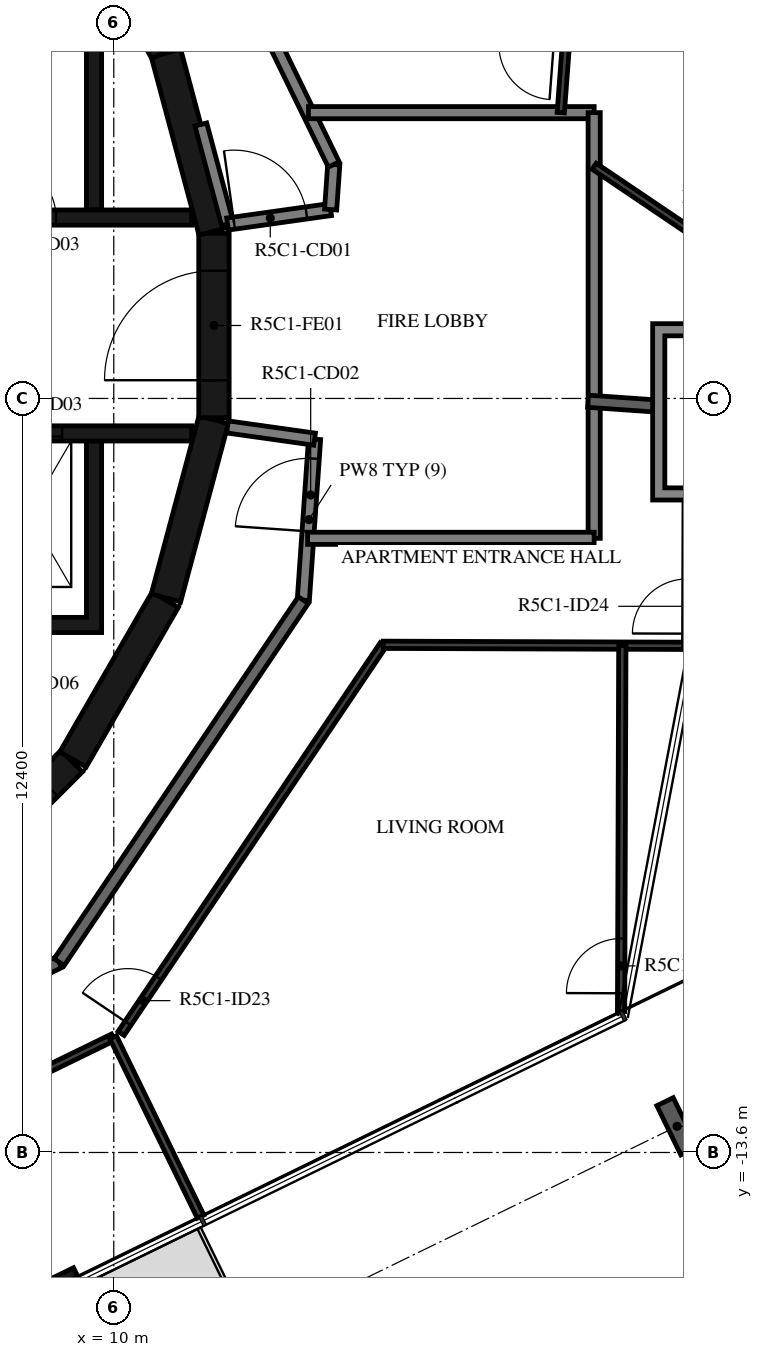
"""IFC4 building model, lengths in metres.
Left out: names, types, materials, properties, quantities, classifications, styles, units other than length and angle.
Written with IfcOpenShell. Run it as: python <this file> out.ifc"""

import sys

from ifc_helpers import new_model, si_unit, direction, frame, frame_2d, origin, origin_2d, place, context, subcontext, project, spatial, polyline, rectangle, i_section, outline, extrude, element, fill, save


model = new_model("IFC4")
c1 = context("Model", 3, precision=1e-05, world=origin(), true_north=direction((0.0, 1.0)))
c2 = subcontext(c1, "Body", "Model", "MODEL_VIEW")
j1 = project(units=[si_unit("LENGTHUNIT", "METRE"), si_unit("PLANEANGLEUNIT", "RADIAN")], contexts=[c1])
p1 = place(None, origin())
s1 = spatial("IfcSite", under=j1, at=p1, CompositionType="ELEMENT")
p2 = place(p1, origin())
s2 = spatial("IfcBuilding", under=s1, at=p2, CompositionType="ELEMENT")
p3 = place(p2, frame((0.0, 0.0, 212.9)))
s3 = spatial("IfcBuildingStorey", under=s2, at=p3, CompositionType="ELEMENT", Elevation=212.9)
p4 = place(p3, frame((19.263, -13.169, -0.38), z_axis=(0.0, 0.0, 1.0), x_axis=(-0.898794095235, -0.438371046456, 0.0)))
e1 = element("IfcColumn", 1, at=p4, inside=s3, PredefinedType="COLUMN", context=c2, shape_type="SweptSolid", body=[
    extrude(i_section(OverallWidth=0.3, OverallDepth=0.9, WebThickness=0.019, FlangeThickness=0.035, FilletRadius=0.03, at=origin_2d()), origin(), (0.0, 0.0, 1.0), 3.5),
])
p5 = place(p3, frame((6.497, -16.97, 0.0), z_axis=(0.0, 0.0, 1.0), x_axis=(0.898778711213, 0.43840258698, 0.0)))
e2 = element("IfcWall", 2, at=p5, inside=s3, PredefinedType="STANDARD", context=c2, shape_type="SweptSolid", body=[
    extrude(rectangle(XDim=3.2, YDim=0.16, at=frame_2d((1.6, 0.0))), origin(), (0.0, 0.0, 1.0), 3.12),
])
p6 = place(p5, frame((0.4, 0.0, 0.0)))
e3 = element("IfcOpeningElement", 3, at=p6, cuts=e2, PredefinedType="OPENING", context=c2, shape_type="SweptSolid", body=[
    extrude(rectangle(XDim=2.4, YDim=2.4, at=frame_2d((1.2, 1.2))), frame((0.0, 0.09, 0.0), z_axis=(0.0, -1.0, 0.0), x_axis=(1.0, 0.0, 0.0)), (0.0, 0.0, 1.0), 0.18),
])
p7 = place(p3, frame((7.164, -9.308, 0.0), z_axis=(0.0, 0.0, 1.0), x_axis=(0.707106781187, 0.707106781187, 0.0)))
e4 = element("IfcWall", 4, at=p7, inside=s3, PredefinedType="SHEAR", context=c2, shape_type="SweptSolid", body=[
    extrude(rectangle(XDim=3.032, YDim=0.5, at=frame_2d((1.516, 0.0))), origin(), (0.0, 0.0, 1.0), 3.12),
])
p8 = place(p7, frame((1.566, 0.0, 0.0)))
e5 = element("IfcOpeningElement", 5, at=p8, cuts=e4, PredefinedType="OPENING", context=c2, shape_type="SweptSolid", body=[
    extrude(rectangle(XDim=0.9, YDim=2.1, at=frame_2d((0.45, 1.05))), frame((0.0, 0.26, 0.0), z_axis=(0.0, -1.0, 0.0), x_axis=(1.0, 0.0, 0.0)), (0.0, 0.0, 1.0), 0.52),
])
for number, where, z_axis, x_axis in (
    (6, (9.329, -7.137, 0.0), (0.0, 0.0, 1.0), (0.5, 0.866, 0.0)),
    (7, (10.858, -4.479, 0.0), (0.0, 0.0, 1.0), (0.259, 0.966, 0.0)),
):
    element("IfcWall", number, at=place(p3, frame(where, z_axis=z_axis, x_axis=x_axis)), inside=s3, PredefinedType="SHEAR", context=c2, shape_type="SweptSolid", body=[
        extrude(rectangle(XDim=3.033, YDim=0.5, at=frame_2d((1.516, 0.0))), origin(), (0.0, 0.0, 1.0), 3.12),
    ])
p9 = place(p3, frame((11.647, -1.516, 0.0), z_axis=(0.0, 0.0, 1.0), x_axis=(0.0, 1.0, 0.0)))
e8 = element("IfcWall", 8, at=p9, inside=s3, PredefinedType="SHEAR", context=c2, shape_type="SweptSolid", body=[
    extrude(rectangle(XDim=3.033, YDim=0.5, at=frame_2d((1.516, 0.0))), origin(), (0.0, 0.0, 1.0), 3.12),
])
p10 = place(p9, frame((0.616, 0.0, 0.0)))
e9 = element("IfcOpeningElement", 9, at=p10, cuts=e8, PredefinedType="OPENING", context=c2, shape_type="SweptSolid", body=[
    extrude(rectangle(XDim=1.8, YDim=2.1, at=frame_2d((0.9, 1.05))), frame((0.0, 0.26, 0.0), z_axis=(0.0, -1.0, 0.0), x_axis=(1.0, 0.0, 0.0)), (0.0, 0.0, 1.0), 0.52),
])
for number, where, z_axis, x_axis in (
    (10, (11.643, 1.55, 0.0), (0.0, 0.0, 1.0), (-0.259, 0.966, 0.0)),
    (11, (10.845, 4.51, 0.0), (0.0, 0.0, 1.0), (-0.5, 0.866, 0.0)),
):
    element("IfcWall", number, at=place(p3, frame(where, z_axis=z_axis, x_axis=x_axis)), inside=s3, PredefinedType="SHEAR", context=c2, shape_type="SweptSolid", body=[
        extrude(rectangle(XDim=3.033, YDim=0.5, at=frame_2d((1.516, 0.0))), origin(), (0.0, 0.0, 1.0), 3.12),
    ])
p11 = place(p3, origin())
e12 = element("IfcWall", 12, at=p11, inside=s3, PredefinedType="SHEAR", context=c2, shape_type="SweptSolid", body=[
    extrude(outline(polyline([(-9.55, 4.8), (-5.5, 4.8), (-5.5, 1.9), (-5.25, 1.9), (-5.25, 4.8), (-1.2, 4.8), (-1.2, 1.9), (-0.95, 1.9), (-0.95, 4.8), (0.95, 4.8), (0.95, 1.9), (1.2, 1.9), (1.2, 4.8), (3.1, 4.8), (3.1, 1.9), (3.35, 1.9), (3.35, 4.8), (5.25, 4.8), (5.25, 1.9), (5.5, 1.9), (5.5, 4.8), (7.4, 4.8), (7.4, 1.9), (7.65, 1.9), (7.65, 4.8), (9.55, 4.8), (9.55, 1.9), (9.8, 1.9), (9.8, 4.8), (9.8, 5.05), (-9.8, 5.05), (-9.8, 4.8), (-9.8, 1.9), (-9.55, 1.9), (-9.55, 4.8)])), origin(), (0.0, 0.0, 1.0), 3.12),
])
p12 = place(p3, origin())
e13 = element("IfcWall", 13, at=p12, inside=s3, PredefinedType="SHEAR", context=c2, shape_type="SweptSolid", body=[
    extrude(outline(polyline([(9.8, -5.05), (9.8, -4.8), (9.8, -1.9), (9.55, -1.9), (9.55, -4.8), (7.65, -4.8), (7.65, -1.9), (7.4, -1.9), (7.4, -4.8), (5.5, -4.8), (5.5, -1.9), (5.25, -1.9), (5.25, -4.8), (3.35, -4.8), (3.35, -1.9), (3.1, -1.9), (3.1, -4.8), (1.2, -4.8), (1.2, -1.9), (0.95, -1.9), (0.95, -4.8), (-5.25, -4.8), (-5.25, -1.9), (-5.5, -1.9), (-5.5, -4.8), (-7.4, -4.8), (-7.4, -1.9), (-7.65, -1.9), (-7.65, -4.8), (-9.55, -4.8), (-9.55, -1.9), (-9.8, -1.9), (-9.8, -4.8), (-9.8, -5.05), (9.8, -5.05)])), origin(), (0.0, 0.0, 1.0), 3.12),
])
p13 = place(p3, frame((3.35, 1.775, 0.0), z_axis=(0.0, 0.0, 1.0), x_axis=(1.0, 0.0, 0.0)))
e14 = element("IfcWall", 14, at=p13, inside=s3, PredefinedType="SHEAR", context=c2, shape_type="SweptSolid", body=[
    extrude(rectangle(XDim=7.93, YDim=0.25, at=frame_2d((3.965, 0.0))), origin(), (0.0, 0.0, 1.0), 3.12),
])
p14 = place(p13, frame((0.35, 0.0, 0.0)))
e15 = element("IfcOpeningElement", 15, at=p14, cuts=e14, PredefinedType="OPENING", context=c2, shape_type="SweptSolid", body=[
    extrude(rectangle(XDim=1.2, YDim=2.4, at=frame_2d((0.6, 1.2))), frame((0.0, 0.135, 0.0), z_axis=(0.0, -1.0, 0.0), x_axis=(1.0, 0.0, 0.0)), (0.0, 0.0, 1.0), 0.27),
])
p15 = place(p13, frame((2.5, 0.0, 0.0)))
e16 = element("IfcOpeningElement", 16, at=p15, cuts=e14, PredefinedType="OPENING", context=c2, shape_type="SweptSolid", body=[
    extrude(rectangle(XDim=1.2, YDim=2.4, at=frame_2d((0.6, 1.2))), frame((0.0, 0.135, 0.0), z_axis=(0.0, -1.0, 0.0), x_axis=(1.0, 0.0, 0.0)), (0.0, 0.0, 1.0), 0.27),
])
p16 = place(p13, frame((4.8, 0.0, 0.0)))
e17 = element("IfcOpeningElement", 17, at=p16, cuts=e14, PredefinedType="OPENING", context=c2, shape_type="SweptSolid", body=[
    extrude(rectangle(XDim=0.9, YDim=2.1, at=frame_2d((0.45, 1.05))), frame((0.0, 0.135, 0.0), z_axis=(0.0, -1.0, 0.0), x_axis=(1.0, 0.0, 0.0)), (0.0, 0.0, 1.0), 0.27),
])
p17 = place(p3, frame((3.35, -1.775, 0.0), z_axis=(0.0, 0.0, 1.0), x_axis=(1.0, 0.0, 0.0)))
e18 = element("IfcWall", 18, at=p17, inside=s3, PredefinedType="SHEAR", context=c2, shape_type="SweptSolid", body=[
    extrude(rectangle(XDim=7.93, YDim=0.25, at=frame_2d((3.965, 0.0))), origin(), (0.0, 0.0, 1.0), 3.12),
])
p18 = place(p17, frame((0.4, 0.0, 0.0)))
e19 = element("IfcOpeningElement", 19, at=p18, cuts=e18, PredefinedType="OPENING", context=c2, shape_type="SweptSolid", body=[
    extrude(rectangle(XDim=1.1, YDim=2.4, at=frame_2d((0.55, 1.2))), frame((0.0, 0.135, 0.0), z_axis=(0.0, -1.0, 0.0), x_axis=(1.0, 0.0, 0.0)), (0.0, 0.0, 1.0), 0.27),
])
p19 = place(p17, frame((2.55, 0.0, 0.0)))
e20 = element("IfcOpeningElement", 20, at=p19, cuts=e18, PredefinedType="OPENING", context=c2, shape_type="SweptSolid", body=[
    extrude(rectangle(XDim=1.1, YDim=2.4, at=frame_2d((0.55, 1.2))), frame((0.0, 0.135, 0.0), z_axis=(0.0, -1.0, 0.0), x_axis=(1.0, 0.0, 0.0)), (0.0, 0.0, 1.0), 0.27),
])
p20 = place(p17, frame((4.7, 0.0, 0.0)))
e21 = element("IfcOpeningElement", 21, at=p20, cuts=e18, PredefinedType="OPENING", context=c2, shape_type="SweptSolid", body=[
    extrude(rectangle(XDim=1.1, YDim=2.4, at=frame_2d((0.55, 1.2))), frame((0.0, 0.135, 0.0), z_axis=(0.0, -1.0, 0.0), x_axis=(1.0, 0.0, 0.0)), (0.0, 0.0, 1.0), 0.27),
])
p21 = place(p3, frame((11.87, 1.668, 0.0), z_axis=(0.0, 0.0, 1.0), x_axis=(-0.258836880648, 0.965921047093, 0.0)))
e22 = element("IfcWall", 22, at=p21, inside=s3, PredefinedType="STANDARD", context=c2, shape_type="SweptSolid", body=[
    extrude(rectangle(XDim=1.695, YDim=0.2, at=frame_2d((0.848, 0.0))), origin(), (0.0, 0.0, 1.0), 3.12),
])
p22 = place(p3, frame((11.87, 1.668, 0.0), z_axis=(0.0, 0.0, 1.0), x_axis=(0.990271931984, 0.139145609792, 0.0)))
e23 = element("IfcWall", 23, at=p22, inside=s3, PredefinedType="STANDARD", context=c2, shape_type="SweptSolid", body=[
    extrude(rectangle(XDim=1.712, YDim=0.2, at=frame_2d((0.856, 0.0))), origin(), (0.0, 0.0, 1.0), 3.12),
])
p23 = place(p22, frame((0.11, 0.0, 0.0)))
e24 = element("IfcOpeningElement", 24, at=p23, cuts=e23, PredefinedType="OPENING", context=c2, shape_type="SweptSolid", body=[
    extrude(rectangle(XDim=1.2, YDim=2.1, at=frame_2d((0.6, 1.05))), frame((0.0, 0.11, 0.0), z_axis=(0.0, -1.0, 0.0), x_axis=(1.0, 0.0, 0.0)), (0.0, 0.0, 1.0), 0.22),
])
p24 = place(p3, frame((13.566, 1.906, 0.0), z_axis=(0.0, 0.0, 1.0), x_axis=(0.07005495793, 0.997543133338, 0.0)))
e25 = element("IfcWall", 25, at=p24, inside=s3, PredefinedType="STANDARD", context=c2, shape_type="SweptSolid", body=[
    extrude(rectangle(XDim=0.742, YDim=0.2, at=frame_2d((0.371, 0.0))), origin(), (0.0, 0.0, 1.0), 3.12),
])
p25 = place(p3, frame((13.618, 2.647, 0.0), z_axis=(0.0, 0.0, 1.0), x_axis=(-0.438366026218, 0.898796543751, 0.0)))
e26 = element("IfcWall", 26, at=p25, inside=s3, PredefinedType="STANDARD", context=c2, shape_type="SweptSolid", body=[
    extrude(rectangle(XDim=7.181, YDim=0.2, at=frame_2d((3.591, 0.0))), origin(), (0.0, 0.0, 1.0), 3.12),
])
p26 = place(p3, frame((13.117, -4.517, 0.0), z_axis=(0.0, 0.0, 1.0), x_axis=(0.069736659613, 0.997565435601, 0.0)))
e27 = element("IfcWall", 27, at=p26, inside=s3, PredefinedType="STANDARD", context=c2, shape_type="SweptSolid", body=[
    extrude(rectangle(XDim=2.654, YDim=0.2, at=frame_2d((1.327, 0.0))), origin(), (0.0, 0.0, 1.0), 3.12),
])
p27 = place(p26, frame((1.134, 0.0, 0.0)))
e28 = element("IfcOpeningElement", 28, at=p27, cuts=e27, PredefinedType="OPENING", context=c2, shape_type="SweptSolid", body=[
    extrude(rectangle(XDim=1.2, YDim=2.1, at=frame_2d((0.6, 1.05))), frame((0.0, 0.11, 0.0), z_axis=(0.0, -1.0, 0.0), x_axis=(1.0, 0.0, 0.0)), (0.0, 0.0, 1.0), 0.22),
])
p28 = place(p3, frame((13.302, -1.869, 0.0), z_axis=(0.0, 0.0, 1.0), x_axis=(-0.990274397042, 0.13912806533, 0.0)))
e29 = element("IfcWall", 29, at=p28, inside=s3, PredefinedType="STANDARD", context=c2, shape_type="SweptSolid", body=[
    extrude(rectangle(XDim=1.446, YDim=0.2, at=frame_2d((0.723, 0.0))), origin(), (0.0, 0.0, 1.0), 3.12),
])
p29 = place(p3, frame((2.647, -13.618, 0.0), z_axis=(0.0, 0.0, 1.0), x_axis=(0.898796543751, 0.438366026218, 0.0)))
e30 = element("IfcWall", 30, at=p29, inside=s3, PredefinedType="STANDARD", context=c2, shape_type="SweptSolid", body=[
    extrude(rectangle(XDim=7.181, YDim=0.2, at=frame_2d((3.591, 0.0))), origin(), (0.0, 0.0, 1.0), 3.12),
])
p30 = place(p29, frame((0.2, 0.0, 0.0)))
e31 = element("IfcOpeningElement", 31, at=p30, cuts=e30, PredefinedType="OPENING", context=c2, shape_type="SweptSolid", body=[
    extrude(rectangle(XDim=1.0, YDim=2.1, at=frame_2d((0.5, 1.05))), frame((0.0, 0.11, 0.0), z_axis=(0.0, -1.0, 0.0), x_axis=(1.0, 0.0, 0.0)), (0.0, 0.0, 1.0), 0.22),
])
p31 = place(p3, frame((9.101, -10.47, 0.0), z_axis=(0.0, 0.0, 1.0), x_axis=(0.559195469534, 0.829035841718, 0.0)))
e32 = element("IfcWall", 32, at=p31, inside=s3, PredefinedType="STANDARD", context=c2, shape_type="SweptSolid", body=[
    extrude(rectangle(XDim=7.181, YDim=0.2, at=frame_2d((3.591, 0.0))), origin(), (0.0, 0.0, 1.0), 3.12),
])
p32 = place(p3, frame((17.9, 3.5, 0.0), z_axis=(0.0, 0.0, 1.0), x_axis=(-1.0, 0.0, 0.0)))
e33 = element("IfcWall", 33, at=p32, inside=s3, PredefinedType="STANDARD", context=c2, shape_type="SweptSolid", body=[
    extrude(rectangle(XDim=4.698, YDim=0.2, at=frame_2d((2.349, 0.0))), origin(), (0.0, 0.0, 1.0), 3.12),
])
p33 = place(p3, frame((17.9, -3.5, 0.0), z_axis=(0.0, 0.0, 1.0), x_axis=(0.0, 1.0, 0.0)))
e34 = element("IfcWall", 34, at=p33, inside=s3, PredefinedType="STANDARD", context=c2, shape_type="SweptSolid", body=[
    extrude(rectangle(XDim=7.0, YDim=0.2, at=frame_2d((3.5, 0.0))), origin(), (0.0, 0.0, 1.0), 3.12),
])
p34 = place(p3, frame((13.188, -3.5, 0.0), z_axis=(0.0, 0.0, 1.0), x_axis=(1.0, 0.0, 0.0)))
e35 = element("IfcWall", 35, at=p34, inside=s3, PredefinedType="STANDARD", context=c2, shape_type="SweptSolid", body=[
    extrude(rectangle(XDim=4.712, YDim=0.2, at=frame_2d((2.356, 0.0))), origin(), (0.0, 0.0, 1.0), 3.12),
])
p35 = place(p3, frame((17.8, -1.246, 0.0), z_axis=(0.0, 0.0, 1.0), x_axis=(0.997562681713, -0.069776042122, 0.0)))
e36 = element("IfcWall", 36, at=p35, inside=s3, PredefinedType="STANDARD", context=c2, shape_type="SweptSolid", body=[
    extrude(rectangle(XDim=1.144, YDim=0.2, at=frame_2d((0.572, 0.0))), origin(), (0.0, 0.0, 1.0), 3.12),
])
p36 = place(p3, frame((17.351, 3.5, 0.0), z_axis=(0.0, 0.0, 1.0), x_axis=(0.075374124137, 0.997155324616, 0.0)))
e37 = element("IfcWall", 37, at=p36, inside=s3, PredefinedType="PARTITIONING", context=c2, shape_type="SweptSolid", body=[
    extrude(rectangle(XDim=1.101, YDim=0.12, at=frame_2d((0.551, 0.0))), origin(), (0.0, 0.0, 1.0), 3.12),
])
p37 = place(p3, frame((21.141, 0.433, 0.0), z_axis=(0.0, 0.0, 1.0), x_axis=(-0.829049908454, 0.559174614313, 0.0)))
e38 = element("IfcWall", 38, at=p37, inside=s3, PredefinedType="PARTITIONING", context=c2, shape_type="SweptSolid", body=[
    extrude(rectangle(XDim=3.909, YDim=0.12, at=frame_2d((1.955, 0.0))), origin(), (0.0, 0.0, 1.0), 3.12),
])
p38 = place(p37, frame((0.8, 0.0, 0.0)))
e39 = element("IfcOpeningElement", 39, at=p38, cuts=e38, PredefinedType="OPENING", context=c2, shape_type="SweptSolid", body=[
    extrude(rectangle(XDim=0.8, YDim=2.1, at=frame_2d((0.4, 1.05))), frame((0.0, 0.07, 0.0), z_axis=(0.0, -1.0, 0.0), x_axis=(1.0, 0.0, 0.0)), (0.0, 0.0, 1.0), 0.14),
])
p39 = place(p3, frame((3.074, -15.078, 0.0), z_axis=(0.0, 0.0, 1.0), x_axis=(0.898800770739, 0.438357359377, 0.0)))
e40 = element("IfcWall", 40, at=p39, inside=s3, PredefinedType="PARTITIONING", context=c2, shape_type="SweptSolid", body=[
    extrude(rectangle(XDim=7.694, YDim=0.12, at=frame_2d((3.847, 0.0))), origin(), (0.0, 0.0, 1.0), 3.12),
])
p40 = place(p39, frame((0.2, 0.0, 0.0)))
e41 = element("IfcOpeningElement", 41, at=p40, cuts=e40, PredefinedType="OPENING", context=c2, shape_type="SweptSolid", body=[
    extrude(rectangle(XDim=0.9, YDim=2.1, at=frame_2d((0.45, 1.05))), frame((0.0, 0.07, 0.0), z_axis=(0.0, -1.0, 0.0), x_axis=(1.0, 0.0, 0.0)), (0.0, 0.0, 1.0), 0.14),
])
p41 = place(p3, frame((10.12, -11.642, 0.0), z_axis=(0.0, 0.0, 1.0), x_axis=(0.559201404667, 0.829031838362, 0.0)))
e42 = element("IfcWall", 42, at=p41, inside=s3, PredefinedType="PARTITIONING", context=c2, shape_type="SweptSolid", body=[
    extrude(rectangle(XDim=7.709, YDim=0.12, at=frame_2d((3.854, 0.0))), origin(), (0.0, 0.0, 1.0), 3.12),
])
p42 = place(p41, frame((0.2, 0.0, 0.0)))
e43 = element("IfcOpeningElement", 43, at=p42, cuts=e42, PredefinedType="OPENING", context=c2, shape_type="SweptSolid", body=[
    extrude(rectangle(XDim=0.9, YDim=2.1, at=frame_2d((0.45, 1.05))), frame((0.0, 0.07, 0.0), z_axis=(0.0, -1.0, 0.0), x_axis=(1.0, 0.0, 0.0)), (0.0, 0.0, 1.0), 0.14),
])
p43 = place(p3, frame((14.431, -5.251, 0.0), z_axis=(0.0, 0.0, 1.0), x_axis=(0.999994153659, -0.003419451456, 0.0)))
e44 = element("IfcWall", 44, at=p43, inside=s3, PredefinedType="PARTITIONING", context=c2, shape_type="SweptSolid", body=[
    extrude(rectangle(XDim=4.998, YDim=0.12, at=frame_2d((2.499, 0.0))), origin(), (0.0, 0.0, 1.0), 3.12),
])
p44 = place(p3, frame((11.427, -14.654, 0.0), z_axis=(0.0, 0.0, 1.0), x_axis=(-0.438410435857, 0.898774882677, 0.0)))
e45 = element("IfcWall", 45, at=p44, inside=s3, PredefinedType="PARTITIONING", context=c2, shape_type="SweptSolid", body=[
    extrude(rectangle(XDim=3.281, YDim=0.12, at=frame_2d((1.64, 0.0))), origin(), (0.0, 0.0, 1.0), 2.73),
])
p45 = place(p3, frame((18.343, -11.282, 0.0), z_axis=(0.0, 0.0, 1.0), x_axis=(0.003448675073, 0.999994053302, 0.0)))
e46 = element("IfcWall", 46, at=p45, inside=s3, PredefinedType="PARTITIONING", context=c2, shape_type="SweptSolid", body=[
    extrude(rectangle(XDim=6.017, YDim=0.12, at=frame_2d((3.009, 0.0))), origin(), (0.0, 0.0, 1.0), 3.12),
])
p46 = place(p45, frame((0.3, 0.0, 0.0)))
e47 = element("IfcOpeningElement", 47, at=p46, cuts=e46, PredefinedType="OPENING", context=c2, shape_type="SweptSolid", body=[
    extrude(rectangle(XDim=0.9, YDim=2.1, at=frame_2d((0.45, 1.05))), frame((0.0, 0.07, 0.0), z_axis=(0.0, -1.0, 0.0), x_axis=(1.0, 0.0, 0.0)), (0.0, 0.0, 1.0), 0.14),
])
p47 = place(p3, origin())
e48 = element("IfcWall", 48, at=p47, inside=s3, PredefinedType="STANDARD", context=c2, shape_type="SweptSolid", body=[
    extrude(outline(polyline([(21.762, 0.03), (21.762, -2.87), (18.862, -2.87), (18.862, 0.03), (21.762, 0.03)]), holes=[polyline([(19.062, -2.67), (21.562, -2.67), (21.562, -0.17), (19.062, -0.17), (19.062, -2.67)])]), origin(), (0.0, 0.0, 1.0), 3.12),
])
p48 = place(p10, origin())
e49 = element("IfcDoor", 49, at=p48, inside=s3, OperationType="DOUBLE_DOOR_SINGLE_SWING", PredefinedType="DOOR", context=c2, shape_type="SweptSolid", body=[
    extrude(rectangle(XDim=1.8, YDim=2.1, at=frame_2d((0.9, 1.05))), frame((0.0, 0.025, 0.0), z_axis=(0.0, -1.0, 0.0), x_axis=(1.0, 0.0, 0.0)), (0.0, 0.0, 1.0), 0.05),
])
fill(e9, e49)
p49 = place(p20, origin())
e50 = element("IfcDoor", 50, at=p49, inside=s3, OperationType="DOUBLE_DOOR_SLIDING", PredefinedType="DOOR", context=c2, shape_type="SweptSolid", body=[
    extrude(rectangle(XDim=1.1, YDim=2.4, at=frame_2d((0.55, 1.2))), frame((0.0, 0.025, 0.0), z_axis=(0.0, -1.0, 0.0), x_axis=(1.0, 0.0, 0.0)), (0.0, 0.0, 1.0), 0.05),
])
fill(e21, e50)
p50 = place(p16, origin())
e51 = element("IfcDoor", 51, at=p50, inside=s3, OperationType="SINGLE_SWING_LEFT", PredefinedType="DOOR", context=c2, shape_type="SweptSolid", body=[
    extrude(rectangle(XDim=0.9, YDim=2.1, at=frame_2d((0.45, 1.05))), frame((0.0, 0.025, 0.0), z_axis=(0.0, -1.0, 0.0), x_axis=(1.0, 0.0, 0.0)), (0.0, 0.0, 1.0), 0.05),
])
fill(e17, e51)
p51 = place(p42, origin())
e52 = element("IfcDoor", 52, at=p51, inside=s3, OperationType="SINGLE_SWING_RIGHT", PredefinedType="DOOR", context=c2, shape_type="SweptSolid", body=[
    extrude(rectangle(XDim=0.9, YDim=2.1, at=frame_2d((0.45, 1.05))), frame((0.0, 0.025, 0.0), z_axis=(0.0, -1.0, 0.0), x_axis=(1.0, 0.0, 0.0)), (0.0, 0.0, 1.0), 0.05),
])
fill(e43, e52)
p52 = place(p46, origin())
e53 = element("IfcDoor", 53, at=p52, inside=s3, OperationType="SINGLE_SWING_RIGHT", PredefinedType="DOOR", context=c2, shape_type="SweptSolid", body=[
    extrude(rectangle(XDim=0.9, YDim=2.1, at=frame_2d((0.45, 1.05))), frame((0.0, 0.025, 0.0), z_axis=(0.0, -1.0, 0.0), x_axis=(1.0, 0.0, 0.0)), (0.0, 0.0, 1.0), 0.05),
])
fill(e47, e53)
p53 = place(p23, origin())
e54 = element("IfcDoor", 54, at=p53, inside=s3, OperationType="DOUBLE_DOOR_SINGLE_SWING", PredefinedType="DOOR", context=c2, shape_type="SweptSolid", body=[
    extrude(rectangle(XDim=1.2, YDim=2.1, at=frame_2d((0.6, 1.05))), frame((0.0, 0.025, 0.0), z_axis=(0.0, -1.0, 0.0), x_axis=(1.0, 0.0, 0.0)), (0.0, 0.0, 1.0), 0.05),
])
fill(e24, e54)
p54 = place(p27, origin())
e55 = element("IfcDoor", 55, at=p54, inside=s3, OperationType="DOUBLE_DOOR_SINGLE_SWING", PredefinedType="DOOR", context=c2, shape_type="SweptSolid", body=[
    extrude(rectangle(XDim=1.2, YDim=2.1, at=frame_2d((0.6, 1.05))), frame((0.0, 0.025, 0.0), z_axis=(0.0, -1.0, 0.0), x_axis=(1.0, 0.0, 0.0)), (0.0, 0.0, 1.0), 0.05),
])
fill(e28, e55)
save(model, sys.argv[1])
